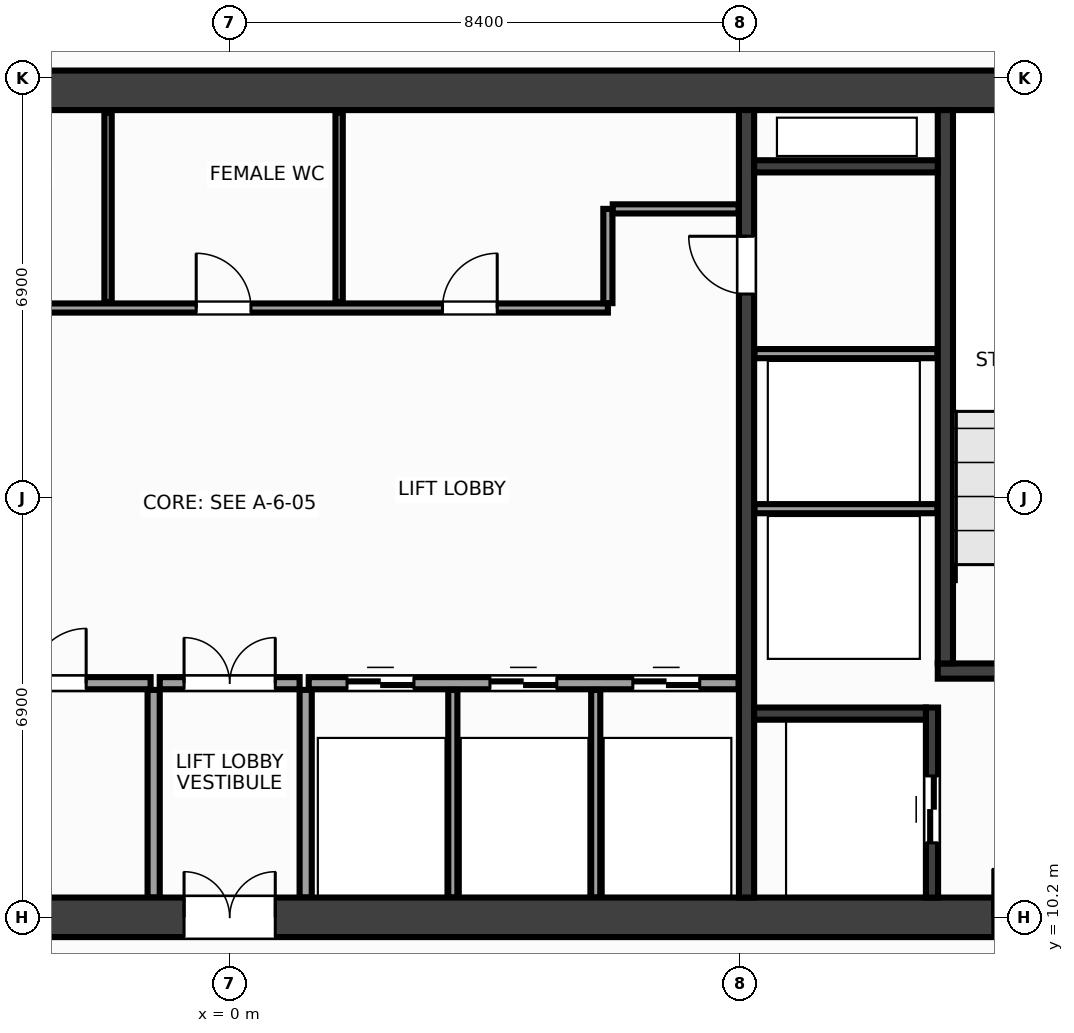
"""IFC4 building model, lengths in metres.
Left out: names, types, materials, properties, quantities, classifications, styles, units other than length and angle.
Written with IfcOpenShell. Run it as: python <this file> out.ifc"""

import sys

from ifc_helpers import new_model, si_unit, direction, frame, frame_2d, origin, place, context, subcontext, project, spatial, rectangle, extrude, source, transform, mapped, element, fill, save


model = new_model("IFC4")
c1 = context("Model", 3, precision=1e-05, world=origin(), true_north=direction((0.0, 1.0)))
c2 = subcontext(c1, "Body", "Model", "MODEL_VIEW")
j1 = project(units=[si_unit("LENGTHUNIT", "METRE"), si_unit("PLANEANGLEUNIT", "RADIAN")], contexts=[c1])
p1 = place(None, origin())
s1 = spatial("IfcSite", under=j1, at=p1, CompositionType="ELEMENT")
p2 = place(p1, origin())
s2 = spatial("IfcBuilding", under=s1, at=p2, CompositionType="ELEMENT")
p3 = place(p2, frame((0.0, 0.0, 164.0)))
s3 = spatial("IfcBuildingStorey", under=s2, at=p3, CompositionType="ELEMENT", Elevation=164.0)
m1 = source(origin(), c2, "Body", "SweptSolid", [
    extrude(rectangle(XDim=31.85, YDim=0.65, at=frame_2d((15.925, 0.0))), origin(), (0.0, 0.0, 1.0), 3.6),
])
p4 = place(p3, frame((-15.925, 23.8, 0.0), z_axis=(0.0, 0.0, 1.0), x_axis=(1.0, 0.0, 0.0)))
e1 = element("IfcWall", 1, at=p4, inside=s3, PredefinedType="SHEAR", context=c2, shape_type="MappedRepresentation", body=[
    mapped(m1, transform((0.0, 0.0, 0.0), x_axis=(1.0, 0.0, 0.0), y_axis=(0.0, 1.0, 0.0), z_axis=(0.0, 0.0, 1.0), scale=1.0)),
])
p5 = place(p3, frame((-15.925, 10.2, 0.0), z_axis=(0.0, 0.0, 1.0), x_axis=(1.0, 0.0, 0.0)))
e2 = element("IfcWall", 2, at=p5, inside=s3, PredefinedType="SHEAR", context=c2, shape_type="MappedRepresentation", body=[
    mapped(m1, transform((0.0, 0.0, 0.0), x_axis=(1.0, 0.0, 0.0), y_axis=(0.0, 1.0, 0.0), z_axis=(0.0, 0.0, 1.0), scale=1.0)),
])
p6 = place(p5, frame((1.775, 0.0, 0.0)))
e3 = element("IfcOpeningElement", 3, at=p6, cuts=e2, PredefinedType="OPENING", context=c2, shape_type="SweptSolid", body=[
    extrude(rectangle(XDim=1.6, YDim=2.15, at=frame_2d((0.8, 1.075))), frame((0.0, 0.337, 0.0), z_axis=(0.0, -1.0, 0.0), x_axis=(1.0, 0.0, 0.0)), (0.0, 0.0, 1.0), 0.674),
])
p7 = place(p5, frame((28.475, 0.0, 0.0)))
e4 = element("IfcOpeningElement", 4, at=p7, cuts=e2, PredefinedType="OPENING", context=c2, shape_type="SweptSolid", body=[
    extrude(rectangle(XDim=1.6, YDim=2.15, at=frame_2d((0.8, 1.075))), frame((0.0, 0.337, 0.0), z_axis=(0.0, -1.0, 0.0), x_axis=(1.0, 0.0, 0.0)), (0.0, 0.0, 1.0), 0.674),
])
p8 = place(p5, frame((15.175, 0.0, 0.0)))
e5 = element("IfcOpeningElement", 5, at=p8, cuts=e2, PredefinedType="OPENING", context=c2, shape_type="SweptSolid", body=[
    extrude(rectangle(XDim=1.5, YDim=2.2, at=frame_2d((0.75, 1.1))), frame((0.0, 0.337, 0.0), z_axis=(0.0, -1.0, 0.0), x_axis=(1.0, 0.0, 0.0)), (0.0, 0.0, 1.0), 0.674),
])
m2 = source(origin(), c2, "Body", "SweptSolid", [
    extrude(rectangle(XDim=12.95, YDim=0.25, at=frame_2d((6.475, 0.0))), origin(), (0.0, 0.0, 1.0), 3.6),
])
p9 = place(p3, frame((8.5, 10.525, 0.0), z_axis=(0.0, 0.0, 1.0), x_axis=(0.0, 1.0, 0.0)))
e6 = element("IfcWall", 6, at=p9, inside=s3, PredefinedType="SHEAR", context=c2, shape_type="MappedRepresentation", body=[
    mapped(m2, transform((0.0, 0.0, 0.0), x_axis=(1.0, 0.0, 0.0), y_axis=(0.0, 1.0, 0.0), z_axis=(0.0, 0.0, 1.0), scale=1.0)),
])
p10 = place(p9, frame((9.925, 0.0, 0.0)))
e7 = element("IfcOpeningElement", 7, at=p10, cuts=e6, PredefinedType="OPENING", context=c2, shape_type="SweptSolid", body=[
    extrude(rectangle(XDim=0.95, YDim=2.15, at=frame_2d((0.475, 1.075))), frame((0.0, 0.137, 0.0), z_axis=(0.0, -1.0, 0.0), x_axis=(1.0, 0.0, 0.0)), (0.0, 0.0, 1.0), 0.274),
])
m3 = source(origin(), c2, "Body", "SweptSolid", [
    extrude(rectangle(XDim=3.63, YDim=0.25, at=frame_2d((1.815, 0.0))), origin(), (0.0, 0.0, 1.0), 3.6),
])
p11 = place(p3, frame((11.645, 14.25, 0.0), z_axis=(0.0, 0.0, 1.0), x_axis=(1.0, 0.0, 0.0)))
e8 = element("IfcWall", 8, at=p11, inside=s3, PredefinedType="SHEAR", context=c2, shape_type="MappedRepresentation", body=[
    mapped(m3, transform((0.0, 0.0, 0.0), x_axis=(1.0, 0.0, 0.0), y_axis=(0.0, 1.0, 0.0), z_axis=(0.0, 0.0, 1.0), scale=1.0)),
])
p12 = place(p11, frame((0.95, 0.0, 0.0)))
e9 = element("IfcOpeningElement", 9, at=p12, cuts=e8, PredefinedType="OPENING", context=c2, shape_type="SweptSolid", body=[
    extrude(rectangle(XDim=1.6, YDim=2.15, at=frame_2d((0.8, 1.075))), frame((0.0, 0.137, 0.0), z_axis=(0.0, -1.0, 0.0), x_axis=(1.0, 0.0, 0.0)), (0.0, 0.0, 1.0), 0.274),
])
m4 = source(origin(), c2, "Body", "SweptSolid", [
    extrude(rectangle(XDim=9.1, YDim=0.25, at=frame_2d((4.55, 0.0))), origin(), (0.0, 0.0, 1.0), 3.6),
])
p13 = place(p3, frame((11.77, 14.375, 0.0), z_axis=(0.0, 0.0, 1.0), x_axis=(0.0, 1.0, 0.0)))
e10 = element("IfcWall", 10, at=p13, inside=s3, PredefinedType="SHEAR", context=c2, shape_type="MappedRepresentation", body=[
    mapped(m4, transform((0.0, 0.0, 0.0), x_axis=(1.0, 0.0, 0.0), y_axis=(0.0, 1.0, 0.0), z_axis=(0.0, 0.0, 1.0), scale=1.0)),
])
m5 = source(origin(), c2, "Body", "SweptSolid", [
    extrude(rectangle(XDim=3.125, YDim=0.2, at=frame_2d((1.562, 0.0))), origin(), (0.0, 0.0, 1.0), 3.6),
])
p14 = place(p3, frame((11.55, 10.525, 0.0), z_axis=(0.0, 0.0, 1.0), x_axis=(0.0, 1.0, 0.0)))
e11 = element("IfcWall", 11, at=p14, inside=s3, PredefinedType="SHEAR", context=c2, shape_type="MappedRepresentation", body=[
    mapped(m5, transform((0.0, 0.0, 0.0), x_axis=(1.0, 0.0, 0.0), y_axis=(0.0, 1.0, 0.0), z_axis=(0.0, 0.0, 1.0), scale=1.0)),
])
p15 = place(p14, frame((0.9, 0.0, 0.0)))
e12 = element("IfcOpeningElement", 12, at=p15, cuts=e11, PredefinedType="OPENING", context=c2, shape_type="SweptSolid", body=[
    extrude(rectangle(XDim=1.1, YDim=2.15, at=frame_2d((0.55, 1.075))), frame((0.0, 0.112, 0.0), z_axis=(0.0, -1.0, 0.0), x_axis=(1.0, 0.0, 0.0)), (0.0, 0.0, 1.0), 0.224),
])
m6 = source(origin(), c2, "Body", "SweptSolid", [
    extrude(rectangle(XDim=2.825, YDim=0.2, at=frame_2d((1.413, 0.0))), origin(), (0.0, 0.0, 1.0), 3.6),
])
p16 = place(p3, frame((8.625, 13.55, 0.0), z_axis=(0.0, 0.0, 1.0), x_axis=(1.0, 0.0, 0.0)))
e13 = element("IfcWall", 13, at=p16, inside=s3, PredefinedType="SHEAR", context=c2, shape_type="MappedRepresentation", body=[
    mapped(m6, transform((0.0, 0.0, 0.0), x_axis=(1.0, 0.0, 0.0), y_axis=(0.0, 1.0, 0.0), z_axis=(0.0, 0.0, 1.0), scale=1.0)),
])
m7 = source(origin(), c2, "Body", "SweptSolid", [
    extrude(rectangle(XDim=3.02, YDim=0.2, at=frame_2d((1.51, 0.0))), origin(), (0.0, 0.0, 1.0), 3.6),
])
p17 = place(p3, frame((8.625, 22.55, 0.0), z_axis=(0.0, 0.0, 1.0), x_axis=(1.0, 0.0, 0.0)))
e14 = element("IfcWall", 14, at=p17, inside=s3, PredefinedType="SHEAR", context=c2, shape_type="MappedRepresentation", body=[
    mapped(m7, transform((0.0, 0.0, 0.0), x_axis=(1.0, 0.0, 0.0), y_axis=(0.0, 1.0, 0.0), z_axis=(0.0, 0.0, 1.0), scale=1.0)),
])
m8 = source(origin(), c2, "Body", "SweptSolid", [
    extrude(rectangle(XDim=3.01, YDim=0.15, at=frame_2d((1.505, 0.0))), origin(), (0.0, 0.0, 1.0), 3.38),
])
for number, where, z_axis, x_axis in (
    (15, (8.63, 16.92, 0.0), (0.0, 0.0, 1.0), (1.0, 0.0, 0.0)),
    (16, (8.63, 19.47, 0.0), (0.0, 0.0, 1.0), (1.0, 0.0, 0.0)),
):
    element("IfcWall", number, at=place(p3, frame(where, z_axis=z_axis, x_axis=x_axis)), inside=s3, PredefinedType="PARTITIONING", context=c2, shape_type="MappedRepresentation", body=[
        mapped(m8, transform((0.0, 0.0, 0.0), x_axis=(1.0, 0.0, 0.0), y_axis=(0.0, 1.0, 0.0), z_axis=(0.0, 0.0, 1.0), scale=1.0)),
    ])
m9 = source(origin(), c2, "Body", "SweptSolid", [
    extrude(rectangle(XDim=7.07, YDim=0.2, at=frame_2d((3.535, 0.0))), origin(), (0.0, 0.0, 1.0), 3.38),
])
p18 = place(p3, frame((-8.37, 14.05, 0.0), z_axis=(0.0, 0.0, 1.0), x_axis=(1.0, 0.0, 0.0)))
e17 = element("IfcWall", 17, at=p18, inside=s3, PredefinedType="PARTITIONING", context=c2, shape_type="MappedRepresentation", body=[
    mapped(m9, transform((0.0, 0.0, 0.0), x_axis=(1.0, 0.0, 0.0), y_axis=(0.0, 1.0, 0.0), z_axis=(0.0, 0.0, 1.0), scale=1.0)),
])
p19 = place(p18, frame((1.66, 0.0, 0.0)))
e18 = element("IfcOpeningElement", 18, at=p19, cuts=e17, PredefinedType="OPENING", context=c2, shape_type="SweptSolid", body=[
    extrude(rectangle(XDim=0.9, YDim=2.15, at=frame_2d((0.45, 1.075))), frame((0.0, 0.112, 0.0), z_axis=(0.0, -1.0, 0.0), x_axis=(1.0, 0.0, 0.0)), (0.0, 0.0, 1.0), 0.224),
])
p20 = place(p18, frame((5.11, 0.0, 0.0)))
e19 = element("IfcOpeningElement", 19, at=p20, cuts=e17, PredefinedType="OPENING", context=c2, shape_type="SweptSolid", body=[
    extrude(rectangle(XDim=0.9, YDim=2.15, at=frame_2d((0.45, 1.075))), frame((0.0, 0.112, 0.0), z_axis=(0.0, -1.0, 0.0), x_axis=(1.0, 0.0, 0.0)), (0.0, 0.0, 1.0), 0.224),
])
p21 = place(p3, frame((1.3, 14.05, 0.0), z_axis=(0.0, 0.0, 1.0), x_axis=(1.0, 0.0, 0.0)))
e20 = element("IfcWall", 20, at=p21, inside=s3, PredefinedType="PARTITIONING", context=c2, shape_type="MappedRepresentation", body=[
    mapped(m9, transform((0.0, 0.0, 0.0), x_axis=(1.0, 0.0, 0.0), y_axis=(0.0, 1.0, 0.0), z_axis=(0.0, 0.0, 1.0), scale=1.0)),
])
p22 = place(p21, frame((0.63, 0.0, 0.0)))
e21 = element("IfcOpeningElement", 21, at=p22, cuts=e20, PredefinedType="OPENING", context=c2, shape_type="SweptSolid", body=[
    extrude(rectangle(XDim=1.1, YDim=2.15, at=frame_2d((0.55, 1.075))), frame((0.0, 0.112, 0.0), z_axis=(0.0, -1.0, 0.0), x_axis=(1.0, 0.0, 0.0)), (0.0, 0.0, 1.0), 0.224),
])
p23 = place(p21, frame((2.98, 0.0, 0.0)))
e22 = element("IfcOpeningElement", 22, at=p23, cuts=e20, PredefinedType="OPENING", context=c2, shape_type="SweptSolid", body=[
    extrude(rectangle(XDim=1.1, YDim=2.15, at=frame_2d((0.55, 1.075))), frame((0.0, 0.112, 0.0), z_axis=(0.0, -1.0, 0.0), x_axis=(1.0, 0.0, 0.0)), (0.0, 0.0, 1.0), 0.224),
])
p24 = place(p21, frame((5.33, 0.0, 0.0)))
e23 = element("IfcOpeningElement", 23, at=p24, cuts=e20, PredefinedType="OPENING", context=c2, shape_type="SweptSolid", body=[
    extrude(rectangle(XDim=1.1, YDim=2.15, at=frame_2d((0.55, 1.075))), frame((0.0, 0.112, 0.0), z_axis=(0.0, -1.0, 0.0), x_axis=(1.0, 0.0, 0.0)), (0.0, 0.0, 1.0), 0.224),
])
m10 = source(origin(), c2, "Body", "SweptSolid", [
    extrude(rectangle(XDim=3.415, YDim=0.2, at=frame_2d((1.708, 0.0))), origin(), (0.0, 0.0, 1.0), 3.38),
])
for number, where, z_axis, x_axis in (
    (24, (-1.25, 10.525, 0.0), (0.0, 0.0, 1.0), (0.0, 1.0, 0.0)),
    (25, (1.25, 10.525, 0.0), (0.0, 0.0, 1.0), (0.0, 1.0, 0.0)),
):
    element("IfcWall", number, at=place(p3, frame(where, z_axis=z_axis, x_axis=x_axis)), inside=s3, PredefinedType="PARTITIONING", context=c2, shape_type="MappedRepresentation", body=[
        mapped(m10, transform((0.0, 0.0, 0.0), x_axis=(1.0, 0.0, 0.0), y_axis=(0.0, 1.0, 0.0), z_axis=(0.0, 0.0, 1.0), scale=1.0)),
    ])
m11 = source(origin(), c2, "Body", "SweptSolid", [
    extrude(rectangle(XDim=2.3, YDim=0.2, at=frame_2d((1.15, 0.0))), origin(), (0.0, 0.0, 1.0), 3.38),
])
p25 = place(p3, frame((-1.15, 14.05, 0.0), z_axis=(0.0, 0.0, 1.0), x_axis=(1.0, 0.0, 0.0)))
e26 = element("IfcWall", 26, at=p25, inside=s3, PredefinedType="PARTITIONING", context=c2, shape_type="MappedRepresentation", body=[
    mapped(m11, transform((0.0, 0.0, 0.0), x_axis=(1.0, 0.0, 0.0), y_axis=(0.0, 1.0, 0.0), z_axis=(0.0, 0.0, 1.0), scale=1.0)),
])
p26 = place(p25, frame((0.4, 0.0, 0.0)))
e27 = element("IfcOpeningElement", 27, at=p26, cuts=e26, PredefinedType="OPENING", context=c2, shape_type="SweptSolid", body=[
    extrude(rectangle(XDim=1.5, YDim=2.2, at=frame_2d((0.75, 1.1))), frame((0.0, 0.112, 0.0), z_axis=(0.0, -1.0, 0.0), x_axis=(1.0, 0.0, 0.0)), (0.0, 0.0, 1.0), 0.224),
])
m12 = source(origin(), c2, "Body", "SweptSolid", [
    extrude(rectangle(XDim=14.59, YDim=0.15, at=frame_2d((7.295, 0.0))), origin(), (0.0, 0.0, 1.0), 3.38),
])
p27 = place(p3, frame((-8.37, 20.22, 0.0), z_axis=(0.0, 0.0, 1.0), x_axis=(1.0, 0.0, 0.0)))
e28 = element("IfcWall", 28, at=p27, inside=s3, PredefinedType="PARTITIONING", context=c2, shape_type="MappedRepresentation", body=[
    mapped(m12, transform((0.0, 0.0, 0.0), x_axis=(1.0, 0.0, 0.0), y_axis=(0.0, 1.0, 0.0), z_axis=(0.0, 0.0, 1.0), scale=1.0)),
])
p28 = place(p27, frame((1.06, 0.0, 0.0)))
e29 = element("IfcOpeningElement", 29, at=p28, cuts=e28, PredefinedType="OPENING", context=c2, shape_type="SweptSolid", body=[
    extrude(rectangle(XDim=0.9, YDim=2.15, at=frame_2d((0.45, 1.075))), frame((0.0, 0.087, 0.0), z_axis=(0.0, -1.0, 0.0), x_axis=(1.0, 0.0, 0.0)), (0.0, 0.0, 1.0), 0.174),
])
p29 = place(p27, frame((4.22, 0.0, 0.0)))
e30 = element("IfcOpeningElement", 30, at=p29, cuts=e28, PredefinedType="OPENING", context=c2, shape_type="SweptSolid", body=[
    extrude(rectangle(XDim=0.9, YDim=2.15, at=frame_2d((0.45, 1.075))), frame((0.0, 0.087, 0.0), z_axis=(0.0, -1.0, 0.0), x_axis=(1.0, 0.0, 0.0)), (0.0, 0.0, 1.0), 0.174),
])
p30 = place(p27, frame((7.82, 0.0, 0.0)))
e31 = element("IfcOpeningElement", 31, at=p30, cuts=e28, PredefinedType="OPENING", context=c2, shape_type="SweptSolid", body=[
    extrude(rectangle(XDim=0.9, YDim=2.15, at=frame_2d((0.45, 1.075))), frame((0.0, 0.087, 0.0), z_axis=(0.0, -1.0, 0.0), x_axis=(1.0, 0.0, 0.0)), (0.0, 0.0, 1.0), 0.174),
])
p31 = place(p27, frame((11.87, 0.0, 0.0)))
e32 = element("IfcOpeningElement", 32, at=p31, cuts=e28, PredefinedType="OPENING", context=c2, shape_type="SweptSolid", body=[
    extrude(rectangle(XDim=0.9, YDim=2.15, at=frame_2d((0.45, 1.075))), frame((0.0, 0.087, 0.0), z_axis=(0.0, -1.0, 0.0), x_axis=(1.0, 0.0, 0.0)), (0.0, 0.0, 1.0), 0.174),
])
m13 = source(origin(), c2, "Body", "SweptSolid", [
    extrude(rectangle(XDim=1.55, YDim=0.15, at=frame_2d((0.775, 0.0))), origin(), (0.0, 0.0, 1.0), 3.38),
])
p32 = place(p3, frame((6.22, 20.3, 0.0), z_axis=(0.0, 0.0, 1.0), x_axis=(0.0, 1.0, 0.0)))
e33 = element("IfcWall", 33, at=p32, inside=s3, PredefinedType="PARTITIONING", context=c2, shape_type="MappedRepresentation", body=[
    mapped(m13, transform((0.0, 0.0, 0.0), x_axis=(1.0, 0.0, 0.0), y_axis=(0.0, 1.0, 0.0), z_axis=(0.0, 0.0, 1.0), scale=1.0)),
])
m14 = source(origin(), c2, "Body", "SweptSolid", [
    extrude(rectangle(XDim=2.07, YDim=0.15, at=frame_2d((1.035, 0.0))), origin(), (0.0, 0.0, 1.0), 3.38),
])
p33 = place(p3, frame((6.3, 21.85, 0.0), z_axis=(0.0, 0.0, 1.0), x_axis=(1.0, 0.0, 0.0)))
e34 = element("IfcWall", 34, at=p33, inside=s3, PredefinedType="PARTITIONING", context=c2, shape_type="MappedRepresentation", body=[
    mapped(m14, transform((0.0, 0.0, 0.0), x_axis=(1.0, 0.0, 0.0), y_axis=(0.0, 1.0, 0.0), z_axis=(0.0, 0.0, 1.0), scale=1.0)),
])
m15 = source(origin(), c2, "Body", "SweptSolid", [
    extrude(rectangle(XDim=3.415, YDim=0.15, at=frame_2d((1.708, 0.0))), origin(), (0.0, 0.0, 1.0), 3.38),
])
for number, where, z_axis, x_axis in (
    (35, (3.67, 10.525, 0.0), (0.0, 0.0, 1.0), (0.0, 1.0, 0.0)),
    (36, (6.02, 10.525, 0.0), (0.0, 0.0, 1.0), (0.0, 1.0, 0.0)),
):
    element("IfcWall", number, at=place(p3, frame(where, z_axis=z_axis, x_axis=x_axis)), inside=s3, PredefinedType="PARTITIONING", context=c2, shape_type="MappedRepresentation", body=[
        mapped(m15, transform((0.0, 0.0, 0.0), x_axis=(1.0, 0.0, 0.0), y_axis=(0.0, 1.0, 0.0), z_axis=(0.0, 0.0, 1.0), scale=1.0)),
    ])
m16 = source(origin(), c2, "Body", "SweptSolid", [
    extrude(rectangle(XDim=3.115, YDim=0.12, at=frame_2d((1.558, 0.0))), origin(), (0.0, 0.0, 1.0), 3.38),
])
for number, where, z_axis, x_axis in (
    (37, (-2.0, 20.32, 0.0), (0.0, 0.0, 1.0), (0.0, 1.0, 0.0)),
    (38, (1.8, 20.32, 0.0), (0.0, 0.0, 1.0), (0.0, 1.0, 0.0)),
):
    element("IfcWall", number, at=place(p3, frame(where, z_axis=z_axis, x_axis=x_axis)), inside=s3, PredefinedType="PARTITIONING", context=c2, shape_type="MappedRepresentation", body=[
        mapped(m16, transform((0.0, 0.0, 0.0), x_axis=(1.0, 0.0, 0.0), y_axis=(0.0, 1.0, 0.0), z_axis=(0.0, 0.0, 1.0), scale=1.0)),
    ])
m17 = source(origin(), c2, "Body", "SweptSolid", [
    extrude(rectangle(XDim=1.6, YDim=2.15, at=frame_2d((0.8, 1.075))), frame((0.0, 0.025, 0.0), z_axis=(0.0, -1.0, 0.0), x_axis=(1.0, 0.0, 0.0)), (0.0, 0.0, 1.0), 0.05),
])
p34 = place(p7, origin())
e39 = element("IfcDoor", 39, at=p34, inside=s3, OperationType="DOUBLE_DOOR_SINGLE_SWING", PredefinedType="DOOR", context=c2, shape_type="MappedRepresentation", body=[
    mapped(m17, transform((0.0, 0.0, 0.0), x_axis=(1.0, 0.0, 0.0), y_axis=(0.0, 1.0, 0.0), z_axis=(0.0, 0.0, 1.0), scale=1.0)),
])
fill(e4, e39)
m18 = source(origin(), c2, "Body", "SweptSolid", [
    extrude(rectangle(XDim=1.1, YDim=2.15, at=frame_2d((0.55, 1.075))), frame((0.0, 0.025, 0.0), z_axis=(0.0, -1.0, 0.0), x_axis=(1.0, 0.0, 0.0)), (0.0, 0.0, 1.0), 0.05),
])
p35 = place(p15, origin())
e40 = element("IfcDoor", 40, at=p35, inside=s3, OperationType="DOUBLE_DOOR_SLIDING", PredefinedType="DOOR", context=c2, shape_type="MappedRepresentation", body=[
    mapped(m18, transform((0.0, 0.0, 0.0), x_axis=(1.0, 0.0, 0.0), y_axis=(0.0, 1.0, 0.0), z_axis=(0.0, 0.0, 1.0), scale=1.0)),
])
fill(e12, e40)
m19 = source(origin(), c2, "Body", "SweptSolid", [
    extrude(rectangle(XDim=0.95, YDim=2.15, at=frame_2d((0.475, 1.075))), frame((0.0, 0.025, 0.0), z_axis=(0.0, -1.0, 0.0), x_axis=(1.0, 0.0, 0.0)), (0.0, 0.0, 1.0), 0.05),
])
p36 = place(p10, origin())
e41 = element("IfcDoor", 41, at=p36, inside=s3, OperationType="SINGLE_SWING_RIGHT", PredefinedType="DOOR", context=c2, shape_type="MappedRepresentation", body=[
    mapped(m19, transform((0.0, 0.0, 0.0), x_axis=(1.0, 0.0, 0.0), y_axis=(0.0, 1.0, 0.0), z_axis=(0.0, 0.0, 1.0), scale=1.0)),
])
fill(e7, e41)
m20 = source(origin(), c2, "Body", "SweptSolid", [
    extrude(rectangle(XDim=0.9, YDim=2.15, at=frame_2d((0.45, 1.075))), frame((0.0, 0.025, 0.0), z_axis=(0.0, -1.0, 0.0), x_axis=(1.0, 0.0, 0.0)), (0.0, 0.0, 1.0), 0.05),
])
p37 = place(p20, origin())
e42 = element("IfcDoor", 42, at=p37, inside=s3, OperationType="SINGLE_SWING_RIGHT", PredefinedType="DOOR", context=c2, shape_type="MappedRepresentation", body=[
    mapped(m20, transform((0.0, 0.0, 0.0), x_axis=(1.0, 0.0, 0.0), y_axis=(0.0, 1.0, 0.0), z_axis=(0.0, 0.0, 1.0), scale=1.0)),
])
fill(e19, e42)
p38 = place(p22, origin())
e43 = element("IfcDoor", 43, at=p38, inside=s3, OperationType="DOUBLE_DOOR_SLIDING", PredefinedType="DOOR", context=c2, shape_type="MappedRepresentation", body=[
    mapped(m18, transform((0.0, 0.0, 0.0), x_axis=(1.0, 0.0, 0.0), y_axis=(0.0, 1.0, 0.0), z_axis=(0.0, 0.0, 1.0), scale=1.0)),
])
fill(e21, e43)
p39 = place(p23, origin())
e44 = element("IfcDoor", 44, at=p39, inside=s3, OperationType="DOUBLE_DOOR_SLIDING", PredefinedType="DOOR", context=c2, shape_type="MappedRepresentation", body=[
    mapped(m18, transform((0.0, 0.0, 0.0), x_axis=(1.0, 0.0, 0.0), y_axis=(0.0, 1.0, 0.0), z_axis=(0.0, 0.0, 1.0), scale=1.0)),
])
fill(e22, e44)
p40 = place(p24, origin())
e45 = element("IfcDoor", 45, at=p40, inside=s3, OperationType="DOUBLE_DOOR_SLIDING", PredefinedType="DOOR", context=c2, shape_type="MappedRepresentation", body=[
    mapped(m18, transform((0.0, 0.0, 0.0), x_axis=(1.0, 0.0, 0.0), y_axis=(0.0, 1.0, 0.0), z_axis=(0.0, 0.0, 1.0), scale=1.0)),
])
fill(e23, e45)
m21 = source(origin(), c2, "Body", "SweptSolid", [
    extrude(rectangle(XDim=1.5, YDim=2.2, at=frame_2d((0.75, 1.1))), frame((0.0, 0.025, 0.0), z_axis=(0.0, -1.0, 0.0), x_axis=(1.0, 0.0, 0.0)), (0.0, 0.0, 1.0), 0.05),
])
p41 = place(p26, origin())
e46 = element("IfcDoor", 46, at=p41, inside=s3, OperationType="DOUBLE_DOOR_SINGLE_SWING", PredefinedType="DOOR", context=c2, shape_type="MappedRepresentation", body=[
    mapped(m21, transform((0.0, 0.0, 0.0), x_axis=(1.0, 0.0, 0.0), y_axis=(0.0, 1.0, 0.0), z_axis=(0.0, 0.0, 1.0), scale=1.0)),
])
fill(e27, e46)
p42 = place(p8, origin())
e47 = element("IfcDoor", 47, at=p42, inside=s3, OperationType="DOUBLE_DOOR_SINGLE_SWING", PredefinedType="DOOR", context=c2, shape_type="MappedRepresentation", body=[
    mapped(m21, transform((0.0, 0.0, 0.0), x_axis=(1.0, 0.0, 0.0), y_axis=(0.0, 1.0, 0.0), z_axis=(0.0, 0.0, 1.0), scale=1.0)),
])
fill(e5, e47)
p43 = place(p30, origin())
e48 = element("IfcDoor", 48, at=p43, inside=s3, OperationType="SINGLE_SWING_LEFT", PredefinedType="DOOR", context=c2, shape_type="MappedRepresentation", body=[
    mapped(m20, transform((0.0, 0.0, 0.0), x_axis=(1.0, 0.0, 0.0), y_axis=(0.0, 1.0, 0.0), z_axis=(0.0, 0.0, 1.0), scale=1.0)),
])
fill(e31, e48)
p44 = place(p31, origin())
e49 = element("IfcDoor", 49, at=p44, inside=s3, OperationType="SINGLE_SWING_RIGHT", PredefinedType="DOOR", context=c2, shape_type="MappedRepresentation", body=[
    mapped(m20, transform((0.0, 0.0, 0.0), x_axis=(1.0, 0.0, 0.0), y_axis=(0.0, 1.0, 0.0), z_axis=(0.0, 0.0, 1.0), scale=1.0)),
])
fill(e32, e49)
save(model, sys.argv[1])
